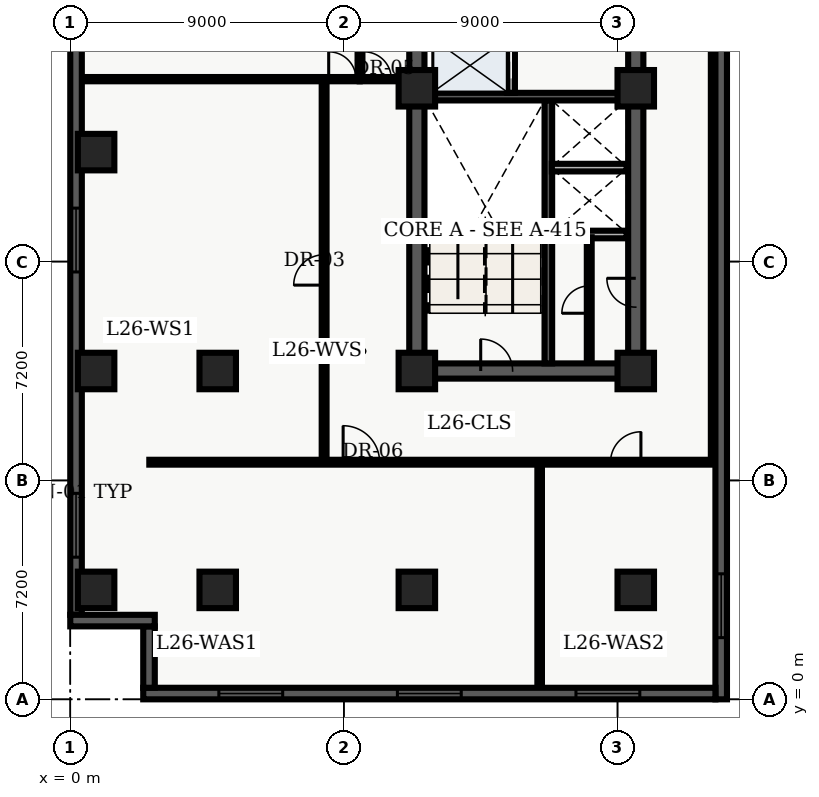
"""IFC4 building model, lengths in metres.
Left out: names, types, materials, properties, quantities, classifications, styles, units other than length and angle.
Written with IfcOpenShell. Run it as: python <this file> out.ifc"""

import sys

from ifc_helpers import new_model, entity, si_unit, converted_unit, direction, frame, origin_with_axes, origin_2d_with_axis, place, context, subcontext, project, spatial, polyline, rectangle, outline, extrude, element, fill, save


model = new_model("IFC4")
c1 = context("Model", 3, precision=1e-05, world=origin_with_axes(), true_north=direction((0.0, 1.0)))
c2 = subcontext(c1, "Body", "Model", "MODEL_VIEW")
j1 = project(units=[si_unit("LENGTHUNIT", "METRE"), converted_unit("PLANEANGLEUNIT", "DEGREE", entity("IfcPlaneAngleMeasure", 0.017), si_unit("PLANEANGLEUNIT", "RADIAN"), dimensions=[0, 0, 0, 0, 0, 0, 0])], contexts=[c1])
p1 = place(None, origin_with_axes())
s1 = spatial("IfcSite", under=j1, at=p1, CompositionType="ELEMENT")
p2 = place(p1, origin_with_axes())
s2 = spatial("IfcBuilding", under=s1, at=p2, CompositionType="ELEMENT")
p3 = place(p2, frame((0.0, 0.0, 108.6), z_axis=(0.0, 0.0, 1.0), x_axis=(1.0, 0.0, 0.0)))
s3 = spatial("IfcBuildingStorey", under=s2, at=p3, CompositionType="ELEMENT", Elevation=108.6)
p4 = place(p3, frame((11.4, 10.8, 0.0), z_axis=(0.0, 0.0, 1.0), x_axis=(0.0, 1.0, 0.0)))
e1 = element("IfcWall", 1, at=p4, inside=s3, PredefinedType="SHEAR", context=c2, shape_type="SweptSolid", body=[
    extrude(outline(polyline([(0.0, -0.25), (27.0, -0.25), (27.0, 0.25), (0.0, 0.25), (0.0, -0.25)])), origin_with_axes(), (0.0, 0.0, 1.0), 3.66),
])
p5 = place(p3, frame((11.4, 10.8, 0.0), z_axis=(0.0, 0.0, 1.0), x_axis=(1.0, 0.0, 0.0)))
e2 = element("IfcWall", 2, at=p5, inside=s3, PredefinedType="SHEAR", context=c2, shape_type="SweptSolid", body=[
    extrude(outline(polyline([(0.0, -0.25), (7.2, -0.25), (7.2, 0.25), (0.0, 0.25), (0.0, -0.25)])), origin_with_axes(), (0.0, 0.0, 1.0), 3.66),
])
p6 = place(p5, frame((2.625, 0.0, 0.0), z_axis=(0.0, 0.0, 1.0), x_axis=(1.0, 0.0, 0.0)))
e3 = element("IfcOpeningElement", 3, at=p6, cuts=e2, PredefinedType="OPENING", context=c2, shape_type="SweptSolid", body=[
    extrude(rectangle(XDim=1.05, YDim=0.52, at=origin_2d_with_axis()), origin_with_axes(), (0.0, 0.0, 1.0), 2.15),
])
p7 = place(p3, frame((18.6, 10.8, 0.0), z_axis=(0.0, 0.0, 1.0), x_axis=(0.0, 1.0, 0.0)))
e4 = element("IfcWall", 4, at=p7, inside=s3, PredefinedType="SHEAR", context=c2, shape_type="SweptSolid", body=[
    extrude(outline(polyline([(0.0, -0.25), (13.5, -0.25), (13.5, 0.25), (0.0, 0.25), (0.0, -0.25)])), origin_with_axes(), (0.0, 0.0, 1.0), 3.66),
])
p8 = place(p7, frame((11.125, 0.0, 0.0), z_axis=(0.0, 0.0, 1.0), x_axis=(1.0, 0.0, 0.0)))
e5 = element("IfcOpeningElement", 5, at=p8, cuts=e4, PredefinedType="OPENING", context=c2, shape_type="SweptSolid", body=[
    extrude(rectangle(XDim=1.05, YDim=0.52, at=origin_2d_with_axis()), origin_with_axes(), (0.0, 0.0, 1.0), 2.15),
])
p9 = place(p7, frame((2.575, 0.0, 0.0), z_axis=(0.0, 0.0, 1.0), x_axis=(1.0, 0.0, 0.0)))
e6 = element("IfcOpeningElement", 6, at=p9, cuts=e4, PredefinedType="OPENING", context=c2, shape_type="SweptSolid", body=[
    extrude(rectangle(XDim=0.95, YDim=0.52, at=origin_2d_with_axis()), origin_with_axes(), (0.0, 0.0, 1.0), 2.15),
])
p10 = place(p3, frame((15.725, 11.05, 0.0), z_axis=(0.0, 0.0, 1.0), x_axis=(0.0, 1.0, 0.0)))
e7 = element("IfcWall", 7, at=p10, inside=s3, PredefinedType="SHEAR", context=c2, shape_type="SweptSolid", body=[
    extrude(outline(polyline([(0.0, -0.125), (8.65, -0.125), (8.65, 0.125), (0.0, 0.125), (0.0, -0.125)])), origin_with_axes(), (0.0, 0.0, 1.0), 3.66),
])
p11 = place(p3, frame((11.65, 19.825, 0.0), z_axis=(0.0, 0.0, 1.0), x_axis=(1.0, 0.0, 0.0)))
e8 = element("IfcWall", 8, at=p11, inside=s3, PredefinedType="SHEAR", context=c2, shape_type="SweptSolid", body=[
    extrude(outline(polyline([(0.0, -0.125), (6.7, -0.125), (6.7, 0.125), (0.0, 0.125), (0.0, -0.125)])), origin_with_axes(), (0.0, 0.0, 1.0), 3.66),
])
p12 = place(p3, frame((14.5, 19.95, 0.0), z_axis=(0.0, 0.0, 1.0), x_axis=(0.0, 1.0, 0.0)))
e9 = element("IfcWall", 9, at=p12, inside=s3, PredefinedType="SOLIDWALL", context=c2, shape_type="SweptSolid", body=[
    extrude(outline(polyline([(0.0, -0.125), (6.25, -0.125), (6.25, 0.125), (0.0, 0.125), (0.0, -0.125)])), origin_with_axes(), (0.0, 0.0, 1.0), 2.7),
])
p13 = place(p12, frame((1.025, 0.0, 0.0), z_axis=(0.0, 0.0, 1.0), x_axis=(1.0, 0.0, 0.0)))
e10 = element("IfcOpeningElement", 10, at=p13, cuts=e9, PredefinedType="OPENING", context=c2, shape_type="SweptSolid", body=[
    extrude(rectangle(XDim=1.1, YDim=0.27, at=origin_2d_with_axis()), origin_with_axes(), (0.0, 0.0, 1.0), 2.15),
])
p14 = place(p12, frame((2.975, 0.0, 0.0), z_axis=(0.0, 0.0, 1.0), x_axis=(1.0, 0.0, 0.0)))
e11 = element("IfcOpeningElement", 11, at=p14, cuts=e9, PredefinedType="OPENING", context=c2, shape_type="SweptSolid", body=[
    extrude(rectangle(XDim=1.1, YDim=0.27, at=origin_2d_with_axis()), origin_with_axes(), (0.0, 0.0, 1.0), 2.15),
])
p15 = place(p12, frame((5.425, 0.0, 0.0), z_axis=(0.0, 0.0, 1.0), x_axis=(1.0, 0.0, 0.0)))
e12 = element("IfcOpeningElement", 12, at=p15, cuts=e9, PredefinedType="OPENING", context=c2, shape_type="SweptSolid", body=[
    extrude(rectangle(XDim=1.2, YDim=0.27, at=origin_2d_with_axis()), origin_with_axes(), (0.0, 0.0, 1.0), 2.15),
])
for number, where, z_axis, x_axis in (
    (13, (11.4, 3.6, 0.0), (0.0, 0.0, 1.0), (1.0, 0.0, 0.0)),
    (14, (11.4, 10.8, 0.0), (0.0, 0.0, 1.0), (1.0, 0.0, 0.0)),
    (15, (11.4, 20.1, 0.0), (0.0, 0.0, 1.0), (1.0, 0.0, 0.0)),
    (16, (18.6, 3.6, 0.0), (0.0, 0.0, 1.0), (1.0, 0.0, 0.0)),
    (17, (18.6, 10.8, 0.0), (0.0, 0.0, 1.0), (1.0, 0.0, 0.0)),
    (18, (18.6, 20.1, 0.0), (0.0, 0.0, 1.0), (1.0, 0.0, 0.0)),
    (19, (4.85, 3.6, 0.0), (0.0, 0.0, 1.0), (1.0, 0.0, 0.0)),
    (20, (4.85, 10.8, 0.0), (0.0, 0.0, 1.0), (1.0, 0.0, 0.0)),
    (21, (0.85, 3.6, 0.0), (0.0, 0.0, 1.0), (1.0, 0.0, 0.0)),
    (22, (0.85, 10.8, 0.0), (0.0, 0.0, 1.0), (1.0, 0.0, 0.0)),
    (23, (0.85, 18.0, 0.0), (0.0, 0.0, 1.0), (1.0, 0.0, 0.0)),
):
    element("IfcColumn", number, at=place(p3, frame(where, z_axis=z_axis, x_axis=x_axis)), inside=s3, PredefinedType="COLUMN", context=c2, shape_type="SweptSolid", body=[
        extrude(rectangle(XDim=1.2, YDim=1.2, at=origin_2d_with_axis()), origin_with_axes(), (0.0, 0.0, 1.0), 3.9),
    ])
for number, where, z_axis, x_axis in (
    (24, (15.84, 15.29, 0.0), (0.0, 0.0, 1.0), (1.0, 0.0, 0.0)),
    (25, (15.84, 17.49, 0.0), (0.0, 0.0, 1.0), (1.0, 0.0, 0.0)),
):
    element("IfcWall", number, at=place(p3, frame(where, z_axis=z_axis, x_axis=x_axis)), inside=s3, PredefinedType="SOLIDWALL", context=c2, shape_type="SweptSolid", body=[
        extrude(outline(polyline([(0.0, -0.125), (2.46, -0.125), (2.46, 0.125), (0.0, 0.125), (0.0, -0.125)])), origin_with_axes(), (0.0, 0.0, 1.0), 2.7),
    ])
p16 = place(p3, frame((17.07, 11.1, 0.0), z_axis=(0.0, 0.0, 1.0), x_axis=(0.0, 1.0, 0.0)))
e26 = element("IfcWall", 26, at=p16, inside=s3, PredefinedType="PARTITIONING", context=c2, shape_type="SweptSolid", body=[
    extrude(outline(polyline([(0.0, -0.08), (4.1, -0.08), (4.1, 0.08), (0.0, 0.08), (0.0, -0.08)])), origin_with_axes(), (0.0, 0.0, 1.0), 2.7),
])
p17 = place(p16, frame((2.05, 0.0, 0.0), z_axis=(0.0, 0.0, 1.0), x_axis=(1.0, 0.0, 0.0)))
e27 = element("IfcOpeningElement", 27, at=p17, cuts=e26, PredefinedType="OPENING", context=c2, shape_type="SweptSolid", body=[
    extrude(rectangle(XDim=0.9, YDim=0.18, at=origin_2d_with_axis()), origin_with_axes(), (0.0, 0.0, 1.0), 2.15),
])
p18 = place(p3, frame((9.52, 20.4, 0.0), z_axis=(0.0, 0.0, 1.0), x_axis=(0.0, 1.0, 0.0)))
e28 = element("IfcWall", 28, at=p18, inside=s3, PredefinedType="PARTITIONING", context=c2, shape_type="SweptSolid", body=[
    extrude(outline(polyline([(0.0, -0.07), (4.0, -0.07), (4.0, 0.07), (0.0, 0.07), (0.0, -0.07)])), origin_with_axes(), (0.0, 0.0, 1.0), 2.7),
])
p19 = place(p3, frame((9.52, 20.4, 0.0), z_axis=(0.0, 0.0, 1.0), x_axis=(1.0, 0.0, 0.0)))
e29 = element("IfcWall", 29, at=p19, inside=s3, PredefinedType="PARTITIONING", context=c2, shape_type="SweptSolid", body=[
    extrude(outline(polyline([(0.0, -0.07), (1.58, -0.07), (1.58, 0.07), (0.0, 0.07), (0.0, -0.07)])), origin_with_axes(), (0.0, 0.0, 1.0), 2.7),
])
p20 = place(p19, frame((0.59, 0.0, 0.0), z_axis=(0.0, 0.0, 1.0), x_axis=(1.0, 0.0, 0.0)))
e30 = element("IfcOpeningElement", 30, at=p20, cuts=e29, PredefinedType="OPENING", context=c2, shape_type="SweptSolid", body=[
    extrude(rectangle(XDim=0.9, YDim=0.16, at=origin_2d_with_axis()), origin_with_axes(), (0.0, 0.0, 1.0), 2.15),
])
p21 = place(p3, frame((2.6, 7.8, 0.0), z_axis=(0.0, 0.0, 1.0), x_axis=(1.0, 0.0, 0.0)))
e31 = element("IfcWall", 31, at=p21, inside=s3, PredefinedType="PARTITIONING", context=c2, shape_type="SweptSolid", body=[
    extrude(outline(polyline([(0.0, -0.08), (18.625, -0.08), (18.625, 0.08), (0.0, 0.08), (0.0, -0.08)])), origin_with_axes(), (0.0, 0.0, 1.0), 2.7),
])
p22 = place(p21, frame((6.975, 0.0, 0.0), z_axis=(0.0, 0.0, 1.0), x_axis=(1.0, 0.0, 0.0)))
e32 = element("IfcOpeningElement", 32, at=p22, cuts=e31, PredefinedType="OPENING", context=c2, shape_type="SweptSolid", body=[
    extrude(rectangle(XDim=1.2, YDim=0.18, at=origin_2d_with_axis()), origin_with_axes(), (0.0, 0.0, 1.0), 2.2),
])
p23 = place(p21, frame((15.669, 0.0, 0.0), z_axis=(0.0, 0.0, 1.0), x_axis=(1.0, 0.0, 0.0)))
e33 = element("IfcOpeningElement", 33, at=p23, cuts=e31, PredefinedType="OPENING", context=c2, shape_type="SweptSolid", body=[
    extrude(rectangle(XDim=1.0, YDim=0.18, at=origin_2d_with_axis()), origin_with_axes(), (0.0, 0.0, 1.0), 2.15),
])
p24 = place(p3, frame((21.15, 7.8, 0.0), z_axis=(0.0, 0.0, 1.0), x_axis=(0.0, 1.0, 0.0)))
e34 = element("IfcWall", 34, at=p24, inside=s3, PredefinedType="PARTITIONING", context=c2, shape_type="SweptSolid", body=[
    extrude(outline(polyline([(0.0, -0.08), (32.7, -0.08), (32.7, 0.08), (0.0, 0.08), (0.0, -0.08)])), origin_with_axes(), (0.0, 0.0, 1.0), 2.7),
])
p25 = place(p3, frame((8.35, 7.8, 0.0), z_axis=(0.0, 0.0, 1.0), x_axis=(0.0, 1.0, 0.0)))
e35 = element("IfcWall", 35, at=p25, inside=s3, PredefinedType="PARTITIONING", context=c2, shape_type="SweptSolid", body=[
    extrude(outline(polyline([(0.0, -0.08), (12.6, -0.08), (12.6, 0.08), (0.0, 0.08), (0.0, -0.08)])), origin_with_axes(), (0.0, 0.0, 1.0), 2.7),
])
p26 = place(p25, frame((6.325, 0.0, 0.0), z_axis=(0.0, 0.0, 1.0), x_axis=(1.0, 0.0, 0.0)))
e36 = element("IfcOpeningElement", 36, at=p26, cuts=e35, PredefinedType="OPENING", context=c2, shape_type="SweptSolid", body=[
    extrude(rectangle(XDim=1.0, YDim=0.18, at=origin_2d_with_axis()), origin_with_axes(), (0.0, 0.0, 1.0), 2.15),
])
p27 = place(p3, frame((0.36, 20.4, 0.0), z_axis=(0.0, 0.0, 1.0), x_axis=(1.0, 0.0, 0.0)))
e37 = element("IfcWall", 37, at=p27, inside=s3, PredefinedType="PARTITIONING", context=c2, shape_type="SweptSolid", body=[
    extrude(outline(polyline([(0.0, -0.07), (9.16, -0.07), (9.16, 0.07), (0.0, 0.07), (0.0, -0.07)])), origin_with_axes(), (0.0, 0.0, 1.0), 2.7),
])
p28 = place(p27, frame((8.59, 0.0, 0.0), z_axis=(0.0, 0.0, 1.0), x_axis=(1.0, 0.0, 0.0)))
e38 = element("IfcOpeningElement", 38, at=p28, cuts=e37, PredefinedType="OPENING", context=c2, shape_type="SweptSolid", body=[
    extrude(rectangle(XDim=0.9, YDim=0.16, at=origin_2d_with_axis()), origin_with_axes(), (0.0, 0.0, 1.0), 2.15),
])
p29 = place(p3, frame((15.439, 0.36, 0.0), z_axis=(0.0, 0.0, 1.0), x_axis=(0.0, 1.0, 0.0)))
e39 = element("IfcWall", 39, at=p29, inside=s3, PredefinedType="PARTITIONING", context=c2, shape_type="SweptSolid", body=[
    extrude(outline(polyline([(0.0, -0.075), (7.34, -0.075), (7.34, 0.075), (0.0, 0.075), (0.0, -0.075)])), origin_with_axes(), (0.0, 0.0, 1.0), 2.7),
])
p30 = place(p3, frame((0.19, 2.78, 0.0), z_axis=(0.0, 0.0, 1.0), x_axis=(0.0, 1.0, 0.0)))
e40 = element("IfcWall", 40, at=p30, inside=s3, PredefinedType="SOLIDWALL", context=c2, shape_type="SweptSolid", body=[
    extrude(outline(polyline([(0.0, -0.19), (43.42, -0.19), (43.42, 0.19), (0.0, 0.19), (0.0, -0.19)])), origin_with_axes(), (0.0, 0.0, 1.0), 3.66),
])
p31 = place(p30, frame((2.946, 0.0, 0.45), z_axis=(0.0, 0.0, 1.0), x_axis=(1.0, 0.0, 0.0)))
e41 = element("IfcOpeningElement", 41, at=p31, cuts=e40, PredefinedType="OPENING", context=c2, shape_type="SweptSolid", body=[
    extrude(rectangle(XDim=2.1, YDim=0.4, at=origin_2d_with_axis()), origin_with_axes(), (0.0, 0.0, 1.0), 2.2),
])
p32 = place(p30, frame((12.328, 0.0, 0.45), z_axis=(0.0, 0.0, 1.0), x_axis=(1.0, 0.0, 0.0)))
e42 = element("IfcOpeningElement", 42, at=p32, cuts=e40, PredefinedType="OPENING", context=c2, shape_type="SweptSolid", body=[
    extrude(rectangle(XDim=2.1, YDim=0.4, at=origin_2d_with_axis()), origin_with_axes(), (0.0, 0.0, 1.0), 2.2),
])
p33 = place(p30, frame((26.401, 0.0, 0.45), z_axis=(0.0, 0.0, 1.0), x_axis=(1.0, 0.0, 0.0)))
e43 = element("IfcOpeningElement", 43, at=p33, cuts=e40, PredefinedType="OPENING", context=c2, shape_type="SweptSolid", body=[
    extrude(rectangle(XDim=2.1, YDim=0.4, at=origin_2d_with_axis()), origin_with_axes(), (0.0, 0.0, 1.0), 2.2),
])
p34 = place(p30, frame((31.092, 0.0, 0.45), z_axis=(0.0, 0.0, 1.0), x_axis=(1.0, 0.0, 0.0)))
e44 = element("IfcOpeningElement", 44, at=p34, cuts=e40, PredefinedType="OPENING", context=c2, shape_type="SweptSolid", body=[
    extrude(rectangle(XDim=2.1, YDim=0.4, at=origin_2d_with_axis()), origin_with_axes(), (0.0, 0.0, 1.0), 2.2),
])
p35 = place(p30, frame((40.024, 0.0, 0.45), z_axis=(0.0, 0.0, 1.0), x_axis=(1.0, 0.0, 0.0)))
e45 = element("IfcOpeningElement", 45, at=p35, cuts=e40, PredefinedType="OPENING", context=c2, shape_type="SweptSolid", body=[
    extrude(rectangle(XDim=2.1, YDim=0.4, at=origin_2d_with_axis()), origin_with_axes(), (0.0, 0.0, 1.0), 2.2),
])
p36 = place(p3, frame((21.41, 45.82, 0.0), z_axis=(0.0, 0.0, 1.0), x_axis=(0.0, -1.0, 0.0)))
e46 = element("IfcWall", 46, at=p36, inside=s3, PredefinedType="SOLIDWALL", context=c2, shape_type="SweptSolid", body=[
    extrude(outline(polyline([(0.0, -0.19), (45.82, -0.19), (45.82, 0.19), (0.0, 0.19), (0.0, -0.19)])), origin_with_axes(), (0.0, 0.0, 1.0), 3.66),
])
p37 = place(p36, frame((3.079, 0.0, 0.45), z_axis=(0.0, 0.0, 1.0), x_axis=(1.0, 0.0, 0.0)))
e47 = element("IfcOpeningElement", 47, at=p37, cuts=e46, PredefinedType="OPENING", context=c2, shape_type="SweptSolid", body=[
    extrude(rectangle(XDim=2.1, YDim=0.4, at=origin_2d_with_axis()), origin_with_axes(), (0.0, 0.0, 1.0), 2.2),
])
p38 = place(p36, frame((42.741, 0.0, 0.45), z_axis=(0.0, 0.0, 1.0), x_axis=(1.0, 0.0, 0.0)))
e48 = element("IfcOpeningElement", 48, at=p38, cuts=e46, PredefinedType="OPENING", context=c2, shape_type="SweptSolid", body=[
    extrude(rectangle(XDim=2.1, YDim=0.4, at=origin_2d_with_axis()), origin_with_axes(), (0.0, 0.0, 1.0), 2.2),
])
p39 = place(p3, frame((21.22, 0.19, 0.0), z_axis=(0.0, 0.0, 1.0), x_axis=(-1.0, 0.0, 0.0)))
e49 = element("IfcWall", 49, at=p39, inside=s3, PredefinedType="SOLIDWALL", context=c2, shape_type="SweptSolid", body=[
    extrude(outline(polyline([(0.0, -0.19), (18.82, -0.19), (18.82, 0.19), (0.0, 0.19), (0.0, -0.19)])), origin_with_axes(), (0.0, 0.0, 1.0), 3.66),
])
p40 = place(p39, frame((3.537, 0.0, 0.45), z_axis=(0.0, 0.0, 1.0), x_axis=(1.0, 0.0, 0.0)))
e50 = element("IfcOpeningElement", 50, at=p40, cuts=e49, PredefinedType="OPENING", context=c2, shape_type="SweptSolid", body=[
    extrude(rectangle(XDim=2.1, YDim=0.4, at=origin_2d_with_axis()), origin_with_axes(), (0.0, 0.0, 1.0), 2.2),
])
p41 = place(p39, frame((9.41, 0.0, 0.45), z_axis=(0.0, 0.0, 1.0), x_axis=(1.0, 0.0, 0.0)))
e51 = element("IfcOpeningElement", 51, at=p41, cuts=e49, PredefinedType="OPENING", context=c2, shape_type="SweptSolid", body=[
    extrude(rectangle(XDim=2.1, YDim=0.4, at=origin_2d_with_axis()), origin_with_axes(), (0.0, 0.0, 1.0), 2.2),
])
p42 = place(p39, frame((15.283, 0.0, 0.45), z_axis=(0.0, 0.0, 1.0), x_axis=(1.0, 0.0, 0.0)))
e52 = element("IfcOpeningElement", 52, at=p42, cuts=e49, PredefinedType="OPENING", context=c2, shape_type="SweptSolid", body=[
    extrude(rectangle(XDim=2.1, YDim=0.4, at=origin_2d_with_axis()), origin_with_axes(), (0.0, 0.0, 1.0), 2.2),
])
p43 = place(p3, frame((2.59, 0.38, 0.0), z_axis=(0.0, 0.0, 1.0), x_axis=(0.0, 1.0, 0.0)))
e53 = element("IfcWall", 53, at=p43, inside=s3, PredefinedType="SOLIDWALL", context=c2, shape_type="SweptSolid", body=[
    extrude(outline(polyline([(0.0, -0.19), (2.02, -0.19), (2.02, 0.19), (0.0, 0.19), (0.0, -0.19)])), origin_with_axes(), (0.0, 0.0, 1.0), 3.66),
])
p44 = place(p3, frame((2.78, 2.59, 0.0), z_axis=(0.0, 0.0, 1.0), x_axis=(-1.0, 0.0, 0.0)))
e54 = element("IfcWall", 54, at=p44, inside=s3, PredefinedType="SOLIDWALL", context=c2, shape_type="SweptSolid", body=[
    extrude(outline(polyline([(0.0, -0.19), (2.78, -0.19), (2.78, 0.19), (0.0, 0.19), (0.0, -0.19)])), origin_with_axes(), (0.0, 0.0, 1.0), 3.66),
])
p45 = place(p12, frame((1.025, 0.0, 0.0), z_axis=(0.0, 0.0, 1.0), x_axis=(1.0, 0.0, 0.0)))
e55 = element("IfcDoor", 55, at=p45, inside=s3, OperationType="SLIDING_TO_LEFT", PredefinedType="DOOR", context=c2, shape_type="SweptSolid", body=[
    extrude(rectangle(XDim=1.1, YDim=0.09, at=origin_2d_with_axis()), origin_with_axes(), (0.0, 0.0, 1.0), 2.15),
])
fill(e10, e55)
p46 = place(p5, frame((2.625, 0.0, 0.0), z_axis=(0.0, 0.0, 1.0), x_axis=(1.0, 0.0, 0.0)))
e56 = element("IfcDoor", 56, at=p46, inside=s3, OperationType="SINGLE_SWING_LEFT", PredefinedType="DOOR", context=c2, shape_type="SweptSolid", body=[
    extrude(rectangle(XDim=1.05, YDim=0.09, at=origin_2d_with_axis()), origin_with_axes(), (0.0, 0.0, 1.0), 2.15),
])
fill(e3, e56)
p47 = place(p16, frame((2.05, 0.0, 0.0), z_axis=(0.0, 0.0, 1.0), x_axis=(1.0, 0.0, 0.0)))
e57 = element("IfcDoor", 57, at=p47, inside=s3, OperationType="SINGLE_SWING_LEFT", PredefinedType="DOOR", context=c2, shape_type="SweptSolid", body=[
    extrude(rectangle(XDim=0.9, YDim=0.09, at=origin_2d_with_axis()), origin_with_axes(), (0.0, 0.0, 1.0), 2.15),
])
fill(e27, e57)
p48 = place(p7, frame((2.575, 0.0, 0.0), z_axis=(0.0, 0.0, 1.0), x_axis=(1.0, 0.0, 0.0)))
e58 = element("IfcDoor", 58, at=p48, inside=s3, OperationType="SINGLE_SWING_RIGHT", PredefinedType="DOOR", context=c2, shape_type="SweptSolid", body=[
    extrude(rectangle(XDim=0.95, YDim=0.09, at=origin_2d_with_axis()), origin_with_axes(), (0.0, 0.0, 1.0), 2.15),
])
fill(e6, e58)
p49 = place(p19, frame((0.59, 0.0, 0.0), z_axis=(0.0, 0.0, 1.0), x_axis=(1.0, 0.0, 0.0)))
e59 = element("IfcDoor", 59, at=p49, inside=s3, OperationType="SINGLE_SWING_LEFT", PredefinedType="DOOR", context=c2, shape_type="SweptSolid", body=[
    extrude(rectangle(XDim=0.9, YDim=0.084, at=origin_2d_with_axis()), origin_with_axes(), (0.0, 0.0, 1.0), 2.15),
])
fill(e30, e59)
p50 = place(p27, frame((8.59, 0.0, 0.0), z_axis=(0.0, 0.0, 1.0), x_axis=(1.0, 0.0, 0.0)))
e60 = element("IfcDoor", 60, at=p50, inside=s3, OperationType="SINGLE_SWING_LEFT", PredefinedType="DOOR", context=c2, shape_type="SweptSolid", body=[
    extrude(rectangle(XDim=0.9, YDim=0.084, at=origin_2d_with_axis()), origin_with_axes(), (0.0, 0.0, 1.0), 2.15),
])
fill(e38, e60)
p51 = place(p25, frame((6.325, 0.0, 0.0), z_axis=(0.0, 0.0, 1.0), x_axis=(1.0, 0.0, 0.0)))
e61 = element("IfcDoor", 61, at=p51, inside=s3, OperationType="SINGLE_SWING_LEFT", PredefinedType="DOOR", context=c2, shape_type="SweptSolid", body=[
    extrude(rectangle(XDim=1.0, YDim=0.09, at=origin_2d_with_axis()), origin_with_axes(), (0.0, 0.0, 1.0), 2.15),
])
fill(e36, e61)
p52 = place(p21, frame((6.975, 0.0, 0.0), z_axis=(0.0, 0.0, 1.0), x_axis=(1.0, 0.0, 0.0)))
e62 = element("IfcDoor", 62, at=p52, inside=s3, OperationType="SINGLE_SWING_LEFT", PredefinedType="DOOR", context=c2, shape_type="SweptSolid", body=[
    extrude(rectangle(XDim=1.2, YDim=0.09, at=origin_2d_with_axis()), origin_with_axes(), (0.0, 0.0, 1.0), 2.2),
])
fill(e32, e62)
p53 = place(p21, frame((15.669, 0.0, 0.0), z_axis=(0.0, 0.0, 1.0), x_axis=(1.0, 0.0, 0.0)))
e63 = element("IfcDoor", 63, at=p53, inside=s3, OperationType="SINGLE_SWING_RIGHT", PredefinedType="DOOR", context=c2, shape_type="SweptSolid", body=[
    extrude(rectangle(XDim=1.0, YDim=0.09, at=origin_2d_with_axis()), origin_with_axes(), (0.0, 0.0, 1.0), 2.15),
])
fill(e33, e63)
p54 = place(p30, frame((2.946, 0.0, 0.45), z_axis=(0.0, 0.0, 1.0), x_axis=(1.0, 0.0, 0.0)))
e64 = element("IfcWindow", 64, at=p54, inside=s3, PredefinedType="WINDOW", context=c2, shape_type="SweptSolid", body=[
    extrude(rectangle(XDim=2.1, YDim=0.09, at=origin_2d_with_axis()), origin_with_axes(), (0.0, 0.0, 1.0), 2.2),
])
fill(e41, e64)
p55 = place(p30, frame((12.328, 0.0, 0.45), z_axis=(0.0, 0.0, 1.0), x_axis=(1.0, 0.0, 0.0)))
e65 = element("IfcWindow", 65, at=p55, inside=s3, PredefinedType="WINDOW", context=c2, shape_type="SweptSolid", body=[
    extrude(rectangle(XDim=2.1, YDim=0.09, at=origin_2d_with_axis()), origin_with_axes(), (0.0, 0.0, 1.0), 2.2),
])
fill(e42, e65)
p56 = place(p36, frame((42.741, 0.0, 0.45), z_axis=(0.0, 0.0, 1.0), x_axis=(1.0, 0.0, 0.0)))
e66 = element("IfcWindow", 66, at=p56, inside=s3, PredefinedType="WINDOW", context=c2, shape_type="SweptSolid", body=[
    extrude(rectangle(XDim=2.1, YDim=0.09, at=origin_2d_with_axis()), origin_with_axes(), (0.0, 0.0, 1.0), 2.2),
])
fill(e48, e66)
p57 = place(p39, frame((3.537, 0.0, 0.45), z_axis=(0.0, 0.0, 1.0), x_axis=(1.0, 0.0, 0.0)))
e67 = element("IfcWindow", 67, at=p57, inside=s3, PredefinedType="WINDOW", context=c2, shape_type="SweptSolid", body=[
    extrude(rectangle(XDim=2.1, YDim=0.09, at=origin_2d_with_axis()), origin_with_axes(), (0.0, 0.0, 1.0), 2.2),
])
fill(e50, e67)
p58 = place(p39, frame((9.41, 0.0, 0.45), z_axis=(0.0, 0.0, 1.0), x_axis=(1.0, 0.0, 0.0)))
e68 = element("IfcWindow", 68, at=p58, inside=s3, PredefinedType="WINDOW", context=c2, shape_type="SweptSolid", body=[
    extrude(rectangle(XDim=2.1, YDim=0.09, at=origin_2d_with_axis()), origin_with_axes(), (0.0, 0.0, 1.0), 2.2),
])
fill(e51, e68)
p59 = place(p39, frame((15.283, 0.0, 0.45), z_axis=(0.0, 0.0, 1.0), x_axis=(1.0, 0.0, 0.0)))
e69 = element("IfcWindow", 69, at=p59, inside=s3, PredefinedType="WINDOW", context=c2, shape_type="SweptSolid", body=[
    extrude(rectangle(XDim=2.1, YDim=0.09, at=origin_2d_with_axis()), origin_with_axes(), (0.0, 0.0, 1.0), 2.2),
])
fill(e52, e69)
save(model, sys.argv[1])
